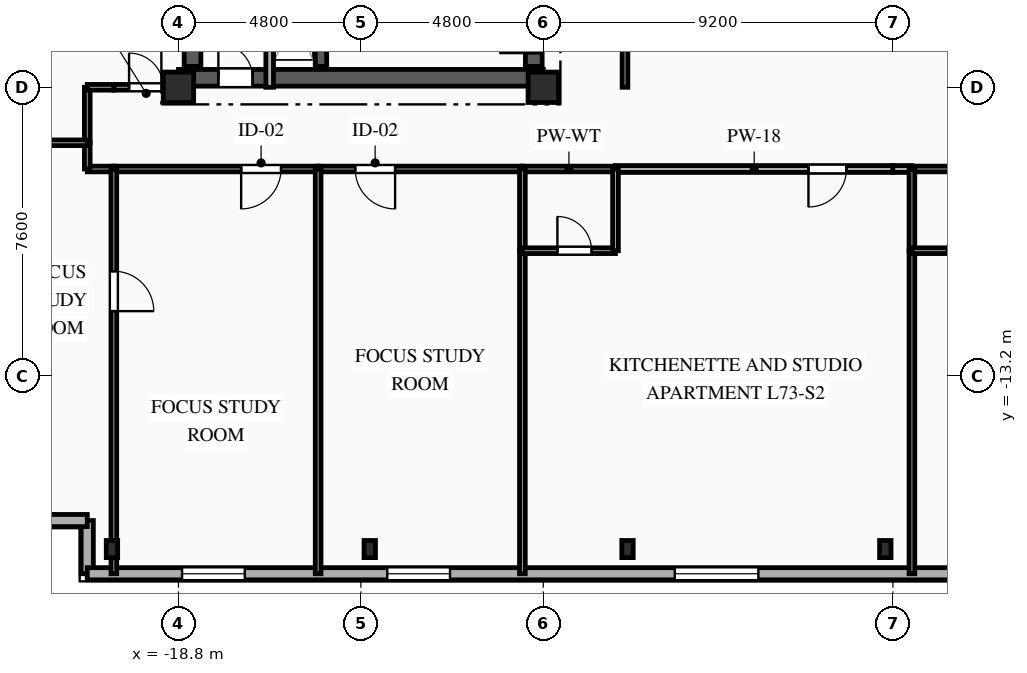
"""IFC4 building model, lengths in metres.
Left out: names, types, materials, properties, quantities, classifications, styles, units other than length and angle.
Written with IfcOpenShell. Run it as: python <this file> out.ifc"""

import sys

from ifc_helpers import new_model, si_unit, direction, frame, frame_2d, origin, origin_2d, place, context, subcontext, project, spatial, rectangle, i_section, extrude, element, fill, save


model = new_model("IFC4")
c1 = context("Model", 3, precision=1e-05, world=origin(), true_north=direction((0.0, 1.0)))
c2 = subcontext(c1, "Body", "Model", "MODEL_VIEW")
j1 = project(units=[si_unit("LENGTHUNIT", "METRE"), si_unit("PLANEANGLEUNIT", "RADIAN")], contexts=[c1])
p1 = place(None, origin())
s1 = spatial("IfcSite", under=j1, at=p1, CompositionType="ELEMENT")
p2 = place(p1, origin())
s2 = spatial("IfcBuilding", under=s1, at=p2, CompositionType="ELEMENT")
p3 = place(p2, frame((0.0, 0.0, 258.45)))
s3 = spatial("IfcBuildingStorey", under=s2, at=p3, CompositionType="ELEMENT", Elevation=258.45)
for number, where, z_axis, x_axis in (
    (1, (-18.8, -5.6, 0.0), (0.0, 0.0, 1.0), (1.0, 0.0, 0.0)),
    (2, (-9.2, -5.6, 0.0), (0.0, 0.0, 1.0), (1.0, 0.0, 0.0)),
):
    element("IfcColumn", number, at=place(p3, frame(where, z_axis=z_axis, x_axis=x_axis)), inside=s3, PredefinedType="COLUMN", context=c2, shape_type="SweptSolid", body=[
        extrude(rectangle(XDim=0.8, YDim=0.8, at=origin_2d()), origin(), (0.0, 0.0, 1.0), 3.35),
    ])
for number, where, z_axis, x_axis in (
    (3, (-20.55, -17.75, 0.0), (0.0, 0.0, 1.0), (1.0, 0.0, 0.0)),
    (4, (-13.767, -17.75, 0.0), (0.0, 0.0, 1.0), (1.0, 0.0, 0.0)),
    (5, (-6.983, -17.75, 0.0), (0.0, 0.0, 1.0), (1.0, 0.0, 0.0)),
    (6, (-0.2, -17.75, 0.0), (0.0, 0.0, 1.0), (1.0, 0.0, 0.0)),
):
    element("IfcColumn", number, at=place(p3, frame(where, z_axis=z_axis, x_axis=x_axis)), inside=s3, PredefinedType="COLUMN", context=c2, shape_type="SweptSolid", body=[
        extrude(i_section(OverallWidth=0.3, OverallDepth=0.45, WebThickness=0.014, FlangeThickness=0.026, FilletRadius=0.027, at=origin_2d()), origin(), (0.0, 0.0, 1.0), 3.35),
    ])
p4 = place(p3, frame((-21.2, -18.4, 0.0), z_axis=(0.0, 0.0, 1.0), x_axis=(0.0, 1.0, 0.0)))
e7 = element("IfcWall", 7, at=p4, inside=s3, PredefinedType="SOLIDWALL", context=c2, shape_type="SweptSolid", body=[
    extrude(rectangle(XDim=1.4, YDim=0.32, at=frame_2d((0.7, 0.0))), origin(), (0.0, 0.0, 1.0), 3.03),
])
p5 = place(p3, frame((-21.2, -17.0, 0.0), z_axis=(0.0, 0.0, 1.0), x_axis=(-1.0, 0.0, 0.0)))
e8 = element("IfcWall", 8, at=p5, inside=s3, PredefinedType="SOLIDWALL", context=c2, shape_type="SweptSolid", body=[
    extrude(rectangle(XDim=1.4, YDim=0.32, at=frame_2d((0.7, 0.0))), origin(), (0.0, 0.0, 1.0), 3.03),
])
p6 = place(p3, frame((20.8, -18.4, 0.0), z_axis=(0.0, 0.0, 1.0), x_axis=(-1.0, 0.0, 0.0)))
e9 = element("IfcWall", 9, at=p6, inside=s3, PredefinedType="SOLIDWALL", context=c2, shape_type="SweptSolid", body=[
    extrude(rectangle(XDim=42.0, YDim=0.32, at=frame_2d((21.0, 0.0))), origin(), (0.0, 0.0, 1.0), 3.03),
])
p7 = place(p6, frame((2.015, 0.0, 0.85)))
e10 = element("IfcOpeningElement", 10, at=p7, cuts=e9, PredefinedType="OPENING", context=c2, shape_type="SweptSolid", body=[
    extrude(rectangle(XDim=1.65, YDim=1.85, at=frame_2d((0.825, 0.925))), frame((0.0, 0.17, 0.0), z_axis=(0.0, -1.0, 0.0), x_axis=(1.0, 0.0, 0.0)), (0.0, 0.0, 1.0), 0.34),
])
p8 = place(p6, frame((6.815, 0.0, 0.85)))
e11 = element("IfcOpeningElement", 11, at=p8, cuts=e9, PredefinedType="OPENING", context=c2, shape_type="SweptSolid", body=[
    extrude(rectangle(XDim=1.65, YDim=1.85, at=frame_2d((0.825, 0.925))), frame((0.0, 0.17, 0.0), z_axis=(0.0, -1.0, 0.0), x_axis=(1.0, 0.0, 0.0)), (0.0, 0.0, 1.0), 0.34),
])
p9 = place(p6, frame((14.1, 0.0, 0.85)))
e12 = element("IfcOpeningElement", 12, at=p9, cuts=e9, PredefinedType="OPENING", context=c2, shape_type="SweptSolid", body=[
    extrude(rectangle(XDim=2.2, YDim=1.85, at=frame_2d((1.1, 0.925))), frame((0.0, 0.17, 0.0), z_axis=(0.0, -1.0, 0.0), x_axis=(1.0, 0.0, 0.0)), (0.0, 0.0, 1.0), 0.34),
])
p10 = place(p6, frame((24.34, 0.0, 0.85)))
e13 = element("IfcOpeningElement", 13, at=p10, cuts=e9, PredefinedType="OPENING", context=c2, shape_type="SweptSolid", body=[
    extrude(rectangle(XDim=2.2, YDim=1.85, at=frame_2d((1.1, 0.925))), frame((0.0, 0.17, 0.0), z_axis=(0.0, -1.0, 0.0), x_axis=(1.0, 0.0, 0.0)), (0.0, 0.0, 1.0), 0.34),
])
p11 = place(p6, frame((32.455, 0.0, 0.85)))
e14 = element("IfcOpeningElement", 14, at=p11, cuts=e9, PredefinedType="OPENING", context=c2, shape_type="SweptSolid", body=[
    extrude(rectangle(XDim=1.65, YDim=1.85, at=frame_2d((0.825, 0.925))), frame((0.0, 0.17, 0.0), z_axis=(0.0, -1.0, 0.0), x_axis=(1.0, 0.0, 0.0)), (0.0, 0.0, 1.0), 0.34),
])
p12 = place(p6, frame((37.855, 0.0, 0.85)))
e15 = element("IfcOpeningElement", 15, at=p12, cuts=e9, PredefinedType="OPENING", context=c2, shape_type="SweptSolid", body=[
    extrude(rectangle(XDim=1.65, YDim=1.85, at=frame_2d((0.825, 0.925))), frame((0.0, 0.17, 0.0), z_axis=(0.0, -1.0, 0.0), x_axis=(1.0, 0.0, 0.0)), (0.0, 0.0, 1.0), 0.34),
])
p13 = place(p3, frame((-18.8, -5.35, 0.0), z_axis=(0.0, 0.0, 1.0), x_axis=(1.0, 0.0, 0.0)))
e16 = element("IfcWall", 16, at=p13, inside=s3, PredefinedType="SHEAR", context=c2, shape_type="SweptSolid", body=[
    extrude(rectangle(XDim=9.6, YDim=0.44, at=frame_2d((4.8, 0.0))), origin(), (0.0, 0.0, 1.0), 3.03),
])
p14 = place(p13, frame((1.05, 0.0, 0.0)))
e17 = element("IfcOpeningElement", 17, at=p14, cuts=e16, PredefinedType="OPENING", context=c2, shape_type="SweptSolid", body=[
    extrude(rectangle(XDim=0.9, YDim=2.1, at=frame_2d((0.45, 1.05))), frame((0.0, 0.23, 0.0), z_axis=(0.0, -1.0, 0.0), x_axis=(1.0, 0.0, 0.0)), (0.0, 0.0, 1.0), 0.46),
])
p15 = place(p3, frame((-18.43, -5.05, 0.0), z_axis=(0.0, 0.0, 1.0), x_axis=(0.0, 1.0, 0.0)))
e18 = element("IfcWall", 18, at=p15, inside=s3, PredefinedType="SHEAR", context=c2, shape_type="SweptSolid", body=[
    extrude(rectangle(XDim=10.1, YDim=0.44, at=frame_2d((5.05, 0.0))), origin(), (0.0, 0.0, 1.0), 3.03),
])
p16 = place(p3, frame((-9.45, -5.05, 0.0), z_axis=(0.0, 0.0, 1.0), x_axis=(0.0, 1.0, 0.0)))
e19 = element("IfcWall", 19, at=p16, inside=s3, PredefinedType="SHEAR", context=c2, shape_type="SweptSolid", body=[
    extrude(rectangle(XDim=10.1, YDim=0.44, at=frame_2d((5.05, 0.0))), origin(), (0.0, 0.0, 1.0), 3.03),
])
p17 = place(p16, frame((7.15, 0.0, 0.0)))
e20 = element("IfcOpeningElement", 20, at=p17, cuts=e19, PredefinedType="OPENING", context=c2, shape_type="SweptSolid", body=[
    extrude(rectangle(XDim=0.9, YDim=2.1, at=frame_2d((0.45, 1.05))), frame((0.0, 0.23, 0.0), z_axis=(0.0, -1.0, 0.0), x_axis=(1.0, 0.0, 0.0)), (0.0, 0.0, 1.0), 0.46),
])
p18 = place(p16, frame((2.4, 0.0, 0.0)))
e21 = element("IfcOpeningElement", 21, at=p18, cuts=e19, PredefinedType="OPENING", context=c2, shape_type="SweptSolid", body=[
    extrude(rectangle(XDim=1.2, YDim=2.15, at=frame_2d((0.6, 1.075))), frame((0.0, 0.23, 0.0), z_axis=(0.0, -1.0, 0.0), x_axis=(1.0, 0.0, 0.0)), (0.0, 0.0, 1.0), 0.46),
])
p19 = place(p16, frame((0.35, 0.0, 0.0)))
e22 = element("IfcOpeningElement", 22, at=p19, cuts=e19, PredefinedType="OPENING", context=c2, shape_type="SweptSolid", body=[
    extrude(rectangle(XDim=0.9, YDim=2.1, at=frame_2d((0.45, 1.05))), frame((0.0, 0.23, 0.0), z_axis=(0.0, -1.0, 0.0), x_axis=(1.0, 0.0, 0.0)), (0.0, 0.0, 1.0), 0.46),
])
p20 = place(p16, frame((5.0, 0.0, 0.0)))
e23 = element("IfcOpeningElement", 23, at=p20, cuts=e19, PredefinedType="OPENING", context=c2, shape_type="SweptSolid", body=[
    extrude(rectangle(XDim=0.9, YDim=2.1, at=frame_2d((0.45, 1.05))), frame((0.0, 0.23, 0.0), z_axis=(0.0, -1.0, 0.0), x_axis=(1.0, 0.0, 0.0)), (0.0, 0.0, 1.0), 0.46),
])
p21 = place(p3, frame((-15.05, -5.05, 0.0), z_axis=(0.0, 0.0, 1.0), x_axis=(0.0, 1.0, 0.0)))
e24 = element("IfcWall", 24, at=p21, inside=s3, PredefinedType="SHEAR", context=c2, shape_type="SweptSolid", body=[
    extrude(rectangle(XDim=10.1, YDim=0.3, at=frame_2d((5.05, 0.0))), origin(), (0.0, 0.0, 1.0), 3.03),
])
p22 = place(p3, frame((-16.4, -5.6, 0.0), z_axis=(0.0, 0.0, 1.0), x_axis=(0.0, 1.0, 0.0)))
e25 = element("IfcWall", 25, at=p22, inside=s3, PredefinedType="PARTITIONING", context=c2, shape_type="SweptSolid", body=[
    extrude(rectangle(XDim=3.49, YDim=0.2, at=frame_2d((1.745, 0.0))), origin(), (0.0, 0.0, 1.0), 3.03),
])
p23 = place(p3, frame((-20.5, -7.75, 0.0), z_axis=(0.0, 0.0, 1.0), x_axis=(-1.0, 0.0, 0.0)))
e26 = element("IfcWall", 26, at=p23, inside=s3, PredefinedType="PARTITIONING", context=c2, shape_type="SweptSolid", body=[
    extrude(rectangle(XDim=0.7, YDim=0.15, at=frame_2d((0.35, 0.0))), origin(), (0.0, 0.0, 1.0), 3.03),
])
p24 = place(p3, frame((-21.2, -7.75, 0.0), z_axis=(0.0, 0.0, 1.0), x_axis=(0.0, 1.0, 0.0)))
e27 = element("IfcWall", 27, at=p24, inside=s3, PredefinedType="PARTITIONING", context=c2, shape_type="SweptSolid", body=[
    extrude(rectangle(XDim=0.69, YDim=0.15, at=frame_2d((0.345, 0.0))), origin(), (0.0, 0.0, 1.0), 2.685),
])
p25 = place(p3, frame((-20.5, -5.6, 0.0), z_axis=(0.0, 0.0, 1.0), x_axis=(1.0, 0.0, 0.0)))
e28 = element("IfcWall", 28, at=p25, inside=s3, PredefinedType="PARTITIONING", context=c2, shape_type="SweptSolid", body=[
    extrude(rectangle(XDim=1.7, YDim=0.15, at=frame_2d((0.85, 0.0))), origin(), (0.0, 0.0, 1.0), 3.03),
])
p26 = place(p25, frame((0.4, 0.0, 0.0)))
e29 = element("IfcOpeningElement", 29, at=p26, cuts=e28, PredefinedType="OPENING", context=c2, shape_type="SweptSolid", body=[
    extrude(rectangle(XDim=0.9, YDim=2.1, at=frame_2d((0.45, 1.05))), frame((0.0, 0.085, 0.0), z_axis=(0.0, -1.0, 0.0), x_axis=(1.0, 0.0, 0.0)), (0.0, 0.0, 1.0), 0.17),
])
p27 = place(p3, frame((-21.2, -7.06, 0.0), z_axis=(0.0, 0.0, 1.0), x_axis=(0.0, 1.0, 0.0)))
e30 = element("IfcWall", 30, at=p27, inside=s3, PredefinedType="PARTITIONING", context=c2, shape_type="SweptSolid", body=[
    extrude(rectangle(XDim=1.46, YDim=0.15, at=frame_2d((0.73, 0.0))), origin(), (0.0, 0.0, 1.0), 2.685),
])
p28 = place(p3, frame((-21.2, -5.6, 0.0), z_axis=(0.0, 0.0, 1.0), x_axis=(1.0, 0.0, 0.0)))
e31 = element("IfcWall", 31, at=p28, inside=s3, PredefinedType="PARTITIONING", context=c2, shape_type="SweptSolid", body=[
    extrude(rectangle(XDim=0.7, YDim=0.15, at=frame_2d((0.35, 0.0))), origin(), (0.0, 0.0, 1.0), 3.03),
])
p29 = place(p3, frame((-15.125, -7.75, 0.0), z_axis=(0.0, 0.0, 1.0), x_axis=(-1.0, 0.0, 0.0)))
e32 = element("IfcWall", 32, at=p29, inside=s3, PredefinedType="PARTITIONING", context=c2, shape_type="SweptSolid", body=[
    extrude(rectangle(XDim=5.375, YDim=0.15, at=frame_2d((2.688, 0.0))), origin(), (0.0, 0.0, 1.0), 3.03),
])
p30 = place(p29, frame((0.976, 0.0, 0.0)))
e33 = element("IfcOpeningElement", 33, at=p30, cuts=e32, PredefinedType="OPENING", context=c2, shape_type="SweptSolid", body=[
    extrude(rectangle(XDim=1.05, YDim=2.15, at=frame_2d((0.525, 1.075))), frame((0.0, 0.085, 0.0), z_axis=(0.0, -1.0, 0.0), x_axis=(1.0, 0.0, 0.0)), (0.0, 0.0, 1.0), 0.17),
])
p31 = place(p3, frame((-9.75, -7.75, 0.0), z_axis=(0.0, 0.0, 1.0), x_axis=(-1.0, 0.0, 0.0)))
e34 = element("IfcWall", 34, at=p31, inside=s3, PredefinedType="PARTITIONING", context=c2, shape_type="SweptSolid", body=[
    extrude(rectangle(XDim=5.375, YDim=0.15, at=frame_2d((2.688, 0.0))), origin(), (0.0, 0.0, 1.0), 3.03),
])
p32 = place(p31, frame((3.349, 0.0, 0.0)))
e35 = element("IfcOpeningElement", 35, at=p32, cuts=e34, PredefinedType="OPENING", context=c2, shape_type="SweptSolid", body=[
    extrude(rectangle(XDim=1.05, YDim=2.15, at=frame_2d((0.525, 1.075))), frame((0.0, 0.085, 0.0), z_axis=(0.0, -1.0, 0.0), x_axis=(1.0, 0.0, 0.0)), (0.0, 0.0, 1.0), 0.17),
])
p33 = place(p3, frame((0.0, -7.75, 0.0), z_axis=(0.0, 0.0, 1.0), x_axis=(-1.0, 0.0, 0.0)))
e36 = element("IfcWall", 36, at=p33, inside=s3, PredefinedType="PARTITIONING", context=c2, shape_type="SweptSolid", body=[
    extrude(rectangle(XDim=7.3, YDim=0.18, at=frame_2d((3.65, 0.0))), origin(), (0.0, 0.0, 1.0), 3.03),
])
p34 = place(p33, frame((1.222, 0.0, 0.0)))
e37 = element("IfcOpeningElement", 37, at=p34, cuts=e36, PredefinedType="OPENING", context=c2, shape_type="SweptSolid", body=[
    extrude(rectangle(XDim=1.0, YDim=2.15, at=frame_2d((0.5, 1.075))), frame((0.0, 0.1, 0.0), z_axis=(0.0, -1.0, 0.0), x_axis=(1.0, 0.0, 0.0)), (0.0, 0.0, 1.0), 0.2),
])
p35 = place(p3, frame((-7.3, -7.75, 0.0), z_axis=(0.0, 0.0, 1.0), x_axis=(-1.0, 0.0, 0.0)))
e38 = element("IfcWall", 38, at=p35, inside=s3, PredefinedType="PLUMBINGWALL", context=c2, shape_type="SweptSolid", body=[
    extrude(rectangle(XDim=2.45, YDim=0.15, at=frame_2d((1.225, 0.0))), origin(), (0.0, 0.0, 1.0), 3.03),
])
p36 = place(p3, frame((0.5, -7.75, 0.0), z_axis=(0.0, 0.0, 1.0), x_axis=(-1.0, 0.0, 0.0)))
e39 = element("IfcWall", 39, at=p36, inside=s3, PredefinedType="PARTITIONING", context=c2, shape_type="SweptSolid", body=[
    extrude(rectangle(XDim=0.5, YDim=0.18, at=frame_2d((0.25, 0.0))), origin(), (0.0, 0.0, 1.0), 3.03),
])
p37 = place(p3, frame((2.95, -7.75, 0.0), z_axis=(0.0, 0.0, 1.0), x_axis=(-1.0, 0.0, 0.0)))
e40 = element("IfcWall", 40, at=p37, inside=s3, PredefinedType="PLUMBINGWALL", context=c2, shape_type="SweptSolid", body=[
    extrude(rectangle(XDim=2.45, YDim=0.15, at=frame_2d((1.225, 0.0))), origin(), (0.0, 0.0, 1.0), 3.03),
])
p38 = place(p3, frame((-7.05, 1.45, 0.0), z_axis=(0.0, 0.0, 1.0), x_axis=(0.0, -1.0, 0.0)))
e41 = element("IfcWall", 41, at=p38, inside=s3, PredefinedType="PARTITIONING", context=c2, shape_type="SweptSolid", body=[
    extrude(rectangle(XDim=7.05, YDim=0.15, at=frame_2d((3.525, 0.0))), origin(), (0.0, 0.0, 1.0), 3.03),
])
p39 = place(p3, frame((-24.0, -7.06, 0.0), z_axis=(0.0, 0.0, 1.0), x_axis=(1.0, 0.0, 0.0)))
e42 = element("IfcWall", 42, at=p39, inside=s3, PredefinedType="PARTITIONING", context=c2, shape_type="SweptSolid", body=[
    extrude(rectangle(XDim=2.8, YDim=0.15, at=frame_2d((1.4, 0.0))), origin(), (0.0, 0.0, 1.0), 3.03),
])
p40 = place(p3, frame((-20.5, -7.75, 0.0), z_axis=(0.0, 0.0, 1.0), x_axis=(0.0, -1.0, 0.0)))
e43 = element("IfcWall", 43, at=p40, inside=s3, PredefinedType="PARTITIONING", context=c2, shape_type="SweptSolid", body=[
    extrude(rectangle(XDim=10.65, YDim=0.15, at=frame_2d((5.325, 0.0))), origin(), (0.0, 0.0, 1.0), 2.655),
])
p41 = place(p40, frame((2.69, 0.0, 0.0)))
e44 = element("IfcOpeningElement", 44, at=p41, cuts=e43, PredefinedType="OPENING", context=c2, shape_type="SweptSolid", body=[
    extrude(rectangle(XDim=1.05, YDim=2.15, at=frame_2d((0.525, 1.075))), frame((0.0, 0.085, 0.0), z_axis=(0.0, -1.0, 0.0), x_axis=(1.0, 0.0, 0.0)), (0.0, 0.0, 1.0), 0.17),
])
p42 = place(p3, frame((-15.125, -7.75, 0.0), z_axis=(0.0, 0.0, 1.0), x_axis=(0.0, -1.0, 0.0)))
e45 = element("IfcWall", 45, at=p42, inside=s3, PredefinedType="PARTITIONING", context=c2, shape_type="SweptSolid", body=[
    extrude(rectangle(XDim=10.65, YDim=0.15, at=frame_2d((5.325, 0.0))), origin(), (0.0, 0.0, 1.0), 3.03),
])
p43 = place(p3, frame((-9.75, -9.9, 0.0), z_axis=(0.0, 0.0, 1.0), x_axis=(0.0, -1.0, 0.0)))
e46 = element("IfcWall", 46, at=p43, inside=s3, PredefinedType="PARTITIONING", context=c2, shape_type="SweptSolid", body=[
    extrude(rectangle(XDim=8.5, YDim=0.15, at=frame_2d((4.25, 0.0))), origin(), (0.0, 0.0, 1.0), 3.03),
])
p44 = place(p3, frame((-9.75, -7.75, 0.0), z_axis=(0.0, 0.0, 1.0), x_axis=(0.0, -1.0, 0.0)))
e47 = element("IfcWall", 47, at=p44, inside=s3, PredefinedType="PLUMBINGWALL", context=c2, shape_type="SweptSolid", body=[
    extrude(rectangle(XDim=2.15, YDim=0.15, at=frame_2d((1.075, 0.0))), origin(), (0.0, 0.0, 1.0), 3.03),
])
p45 = place(p3, frame((-9.75, -9.9, 0.0), z_axis=(0.0, 0.0, 1.0), x_axis=(1.0, 0.0, 0.0)))
e48 = element("IfcWall", 48, at=p45, inside=s3, PredefinedType="PLUMBINGWALL", context=c2, shape_type="SweptSolid", body=[
    extrude(rectangle(XDim=2.45, YDim=0.15, at=frame_2d((1.225, 0.0))), origin(), (0.0, 0.0, 1.0), 3.03),
])
p46 = place(p45, frame((0.921, 0.0, 0.0)))
e49 = element("IfcOpeningElement", 49, at=p46, cuts=e48, PredefinedType="OPENING", context=c2, shape_type="SweptSolid", body=[
    extrude(rectangle(XDim=0.9, YDim=2.1, at=frame_2d((0.45, 1.05))), frame((0.0, 0.085, 0.0), z_axis=(0.0, -1.0, 0.0), x_axis=(1.0, 0.0, 0.0)), (0.0, 0.0, 1.0), 0.17),
])
p47 = place(p3, frame((-7.3, -9.9, 0.0), z_axis=(0.0, 0.0, 1.0), x_axis=(0.0, 1.0, 0.0)))
e50 = element("IfcWall", 50, at=p47, inside=s3, PredefinedType="PLUMBINGWALL", context=c2, shape_type="SweptSolid", body=[
    extrude(rectangle(XDim=2.15, YDim=0.15, at=frame_2d((1.075, 0.0))), origin(), (0.0, 0.0, 1.0), 3.03),
])
p48 = place(p3, frame((0.5, -9.9, 0.0), z_axis=(0.0, 0.0, 1.0), x_axis=(0.0, -1.0, 0.0)))
e51 = element("IfcWall", 51, at=p48, inside=s3, PredefinedType="PARTITIONING", context=c2, shape_type="SweptSolid", body=[
    extrude(rectangle(XDim=8.5, YDim=0.15, at=frame_2d((4.25, 0.0))), origin(), (0.0, 0.0, 1.0), 3.03),
])
p49 = place(p3, frame((0.5, -7.75, 0.0), z_axis=(0.0, 0.0, 1.0), x_axis=(0.0, -1.0, 0.0)))
e52 = element("IfcWall", 52, at=p49, inside=s3, PredefinedType="PLUMBINGWALL", context=c2, shape_type="SweptSolid", body=[
    extrude(rectangle(XDim=2.15, YDim=0.15, at=frame_2d((1.075, 0.0))), origin(), (0.0, 0.0, 1.0), 3.03),
])
p50 = place(p3, frame((0.5, -9.9, 0.0), z_axis=(0.0, 0.0, 1.0), x_axis=(1.0, 0.0, 0.0)))
e53 = element("IfcWall", 53, at=p50, inside=s3, PredefinedType="PLUMBINGWALL", context=c2, shape_type="SweptSolid", body=[
    extrude(rectangle(XDim=2.45, YDim=0.15, at=frame_2d((1.225, 0.0))), origin(), (0.0, 0.0, 1.0), 3.03),
])
p51 = place(p50, frame((0.921, 0.0, 0.0)))
e54 = element("IfcOpeningElement", 54, at=p51, cuts=e53, PredefinedType="OPENING", context=c2, shape_type="SweptSolid", body=[
    extrude(rectangle(XDim=0.9, YDim=2.1, at=frame_2d((0.45, 1.05))), frame((0.0, 0.085, 0.0), z_axis=(0.0, -1.0, 0.0), x_axis=(1.0, 0.0, 0.0)), (0.0, 0.0, 1.0), 0.17),
])
p52 = place(p10, origin())
e55 = element("IfcWindow", 55, at=p52, inside=s3, PartitioningType="SINGLE_PANEL", PredefinedType="WINDOW", context=c2, shape_type="SweptSolid", body=[
    extrude(rectangle(XDim=2.2, YDim=1.85, at=frame_2d((1.1, 0.925))), frame((0.0, 0.03, 0.0), z_axis=(0.0, -1.0, 0.0), x_axis=(1.0, 0.0, 0.0)), (0.0, 0.0, 1.0), 0.06),
])
fill(e13, e55)
p53 = place(p11, origin())
e56 = element("IfcWindow", 56, at=p53, inside=s3, PartitioningType="SINGLE_PANEL", PredefinedType="WINDOW", context=c2, shape_type="SweptSolid", body=[
    extrude(rectangle(XDim=1.65, YDim=1.85, at=frame_2d((0.825, 0.925))), frame((0.0, 0.03, 0.0), z_axis=(0.0, -1.0, 0.0), x_axis=(1.0, 0.0, 0.0)), (0.0, 0.0, 1.0), 0.06),
])
fill(e14, e56)
p54 = place(p12, origin())
e57 = element("IfcWindow", 57, at=p54, inside=s3, PartitioningType="SINGLE_PANEL", PredefinedType="WINDOW", context=c2, shape_type="SweptSolid", body=[
    extrude(rectangle(XDim=1.65, YDim=1.85, at=frame_2d((0.825, 0.925))), frame((0.0, 0.03, 0.0), z_axis=(0.0, -1.0, 0.0), x_axis=(1.0, 0.0, 0.0)), (0.0, 0.0, 1.0), 0.06),
])
fill(e15, e57)
p55 = place(p14, origin())
e58 = element("IfcDoor", 58, at=p55, inside=s3, OperationType="SINGLE_SWING_LEFT", PredefinedType="DOOR", context=c2, shape_type="SweptSolid", body=[
    extrude(rectangle(XDim=0.9, YDim=2.1, at=frame_2d((0.45, 1.05))), frame((0.0, 0.025, 0.0), z_axis=(0.0, -1.0, 0.0), x_axis=(1.0, 0.0, 0.0)), (0.0, 0.0, 1.0), 0.05),
])
fill(e17, e58)
p56 = place(p19, origin())
e59 = element("IfcDoor", 59, at=p56, inside=s3, OperationType="SINGLE_SWING_LEFT", PredefinedType="DOOR", context=c2, shape_type="SweptSolid", body=[
    extrude(rectangle(XDim=0.9, YDim=2.1, at=frame_2d((0.45, 1.05))), frame((0.0, 0.025, 0.0), z_axis=(0.0, -1.0, 0.0), x_axis=(1.0, 0.0, 0.0)), (0.0, 0.0, 1.0), 0.05),
])
fill(e22, e59)
p57 = place(p26, origin())
e60 = element("IfcDoor", 60, at=p57, inside=s3, OperationType="SINGLE_SWING_LEFT", PredefinedType="DOOR", context=c2, shape_type="SweptSolid", body=[
    extrude(rectangle(XDim=0.9, YDim=2.1, at=frame_2d((0.45, 1.05))), frame((0.0, 0.025, 0.0), z_axis=(0.0, -1.0, 0.0), x_axis=(1.0, 0.0, 0.0)), (0.0, 0.0, 1.0), 0.05),
])
fill(e29, e60)
p58 = place(p30, origin())
e61 = element("IfcDoor", 61, at=p58, inside=s3, OperationType="SINGLE_SWING_RIGHT", PredefinedType="DOOR", context=c2, shape_type="SweptSolid", body=[
    extrude(rectangle(XDim=1.05, YDim=2.15, at=frame_2d((0.525, 1.075))), frame((0.0, 0.025, 0.0), z_axis=(0.0, -1.0, 0.0), x_axis=(1.0, 0.0, 0.0)), (0.0, 0.0, 1.0), 0.05),
])
fill(e33, e61)
p59 = place(p32, origin())
e62 = element("IfcDoor", 62, at=p59, inside=s3, OperationType="SINGLE_SWING_LEFT", PredefinedType="DOOR", context=c2, shape_type="SweptSolid", body=[
    extrude(rectangle(XDim=1.05, YDim=2.15, at=frame_2d((0.525, 1.075))), frame((0.0, 0.025, 0.0), z_axis=(0.0, -1.0, 0.0), x_axis=(1.0, 0.0, 0.0)), (0.0, 0.0, 1.0), 0.05),
])
fill(e35, e62)
p60 = place(p34, origin())
e63 = element("IfcDoor", 63, at=p60, inside=s3, OperationType="SINGLE_SWING_RIGHT", PredefinedType="DOOR", context=c2, shape_type="SweptSolid", body=[
    extrude(rectangle(XDim=1.0, YDim=2.15, at=frame_2d((0.5, 1.075))), frame((0.0, 0.025, 0.0), z_axis=(0.0, -1.0, 0.0), x_axis=(1.0, 0.0, 0.0)), (0.0, 0.0, 1.0), 0.05),
])
fill(e37, e63)
p61 = place(p41, origin())
e64 = element("IfcDoor", 64, at=p61, inside=s3, OperationType="SINGLE_SWING_RIGHT", PredefinedType="DOOR", context=c2, shape_type="SweptSolid", body=[
    extrude(rectangle(XDim=1.05, YDim=2.15, at=frame_2d((0.525, 1.075))), frame((0.0, 0.025, 0.0), z_axis=(0.0, -1.0, 0.0), x_axis=(1.0, 0.0, 0.0)), (0.0, 0.0, 1.0), 0.05),
])
fill(e44, e64)
p62 = place(p46, origin())
e65 = element("IfcDoor", 65, at=p62, inside=s3, OperationType="SINGLE_SWING_LEFT", PredefinedType="DOOR", context=c2, shape_type="SweptSolid", body=[
    extrude(rectangle(XDim=0.9, YDim=2.1, at=frame_2d((0.45, 1.05))), frame((0.0, 0.025, 0.0), z_axis=(0.0, -1.0, 0.0), x_axis=(1.0, 0.0, 0.0)), (0.0, 0.0, 1.0), 0.05),
])
fill(e49, e65)
p63 = place(p51, origin())
e66 = element("IfcDoor", 66, at=p63, inside=s3, OperationType="SINGLE_SWING_RIGHT", PredefinedType="DOOR", context=c2, shape_type="SweptSolid", body=[
    extrude(rectangle(XDim=0.9, YDim=2.1, at=frame_2d((0.45, 1.05))), frame((0.0, 0.025, 0.0), z_axis=(0.0, -1.0, 0.0), x_axis=(1.0, 0.0, 0.0)), (0.0, 0.0, 1.0), 0.05),
])
fill(e54, e66)
save(model, sys.argv[1])
